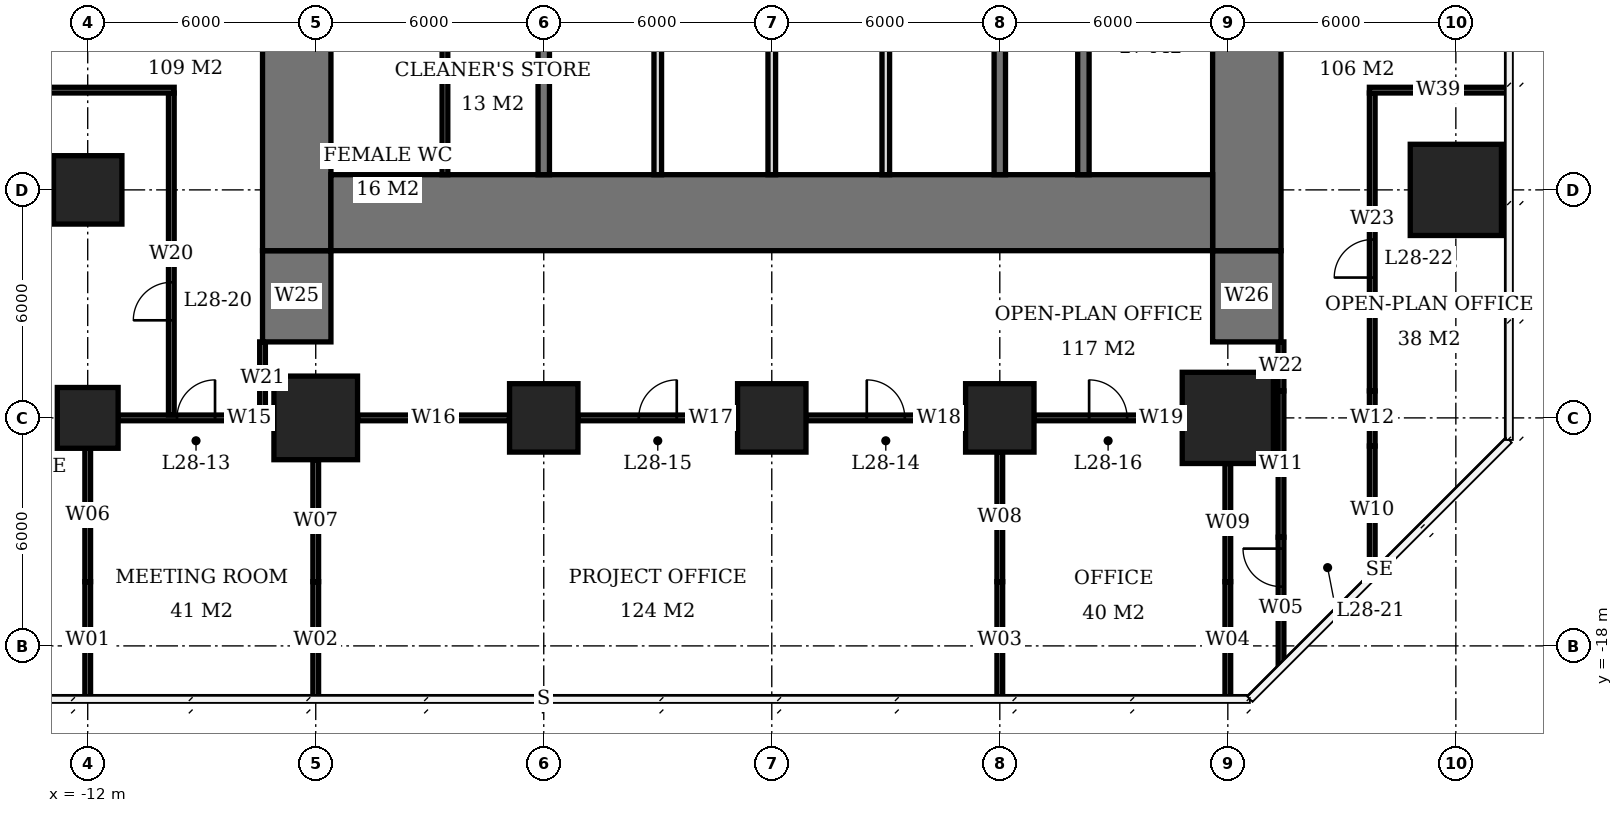
"""IFC4 building model, lengths in metres.
Left out: names, types, materials, properties, quantities, classifications, styles, units other than length and angle.
Written with IfcOpenShell. Run it as: python <this file> out.ifc"""

import sys

from ifc_helpers import new_model, si_unit, direction, frame, frame_2d, origin, origin_2d, place, context, subcontext, project, spatial, rectangle, extrude, element, fill, save


model = new_model("IFC4")
c1 = context("Model", 3, precision=1e-05, world=origin(), true_north=direction((0.0, 1.0)))
c2 = subcontext(c1, "Body", "Model", "MODEL_VIEW")
j1 = project(units=[si_unit("LENGTHUNIT", "METRE"), si_unit("PLANEANGLEUNIT", "RADIAN")], contexts=[c1])
p1 = place(None, origin())
s1 = spatial("IfcSite", under=j1, at=p1, CompositionType="ELEMENT")
p2 = place(p1, origin())
s2 = spatial("IfcBuilding", under=s1, at=p2, CompositionType="ELEMENT")
p3 = place(p2, frame((0.0, 0.0, 117.2)))
s3 = spatial("IfcBuildingStorey", under=s2, at=p3, CompositionType="ELEMENT", Elevation=117.2)
p4 = place(p3, frame((-12.0, -12.0, 0.0), z_axis=(0.0, 0.0, 1.0), x_axis=(1.0, 0.0, 0.0)))
e1 = element("IfcColumn", 1, at=p4, inside=s3, PredefinedType="COLUMN", context=c2, shape_type="SweptSolid", body=[
    extrude(rectangle(XDim=1.6, YDim=1.6, at=origin_2d()), origin(), (0.0, 0.0, 1.0), 3.9),
])
p5 = place(p3, frame((-12.0, -6.0, 0.0), z_axis=(0.0, 0.0, 1.0), x_axis=(1.0, 0.0, 0.0)))
e2 = element("IfcColumn", 2, at=p5, inside=s3, PredefinedType="COLUMN", context=c2, shape_type="SweptSolid", body=[
    extrude(rectangle(XDim=1.8, YDim=1.8, at=origin_2d()), origin(), (0.0, 0.0, 1.0), 3.9),
])
p6 = place(p3, frame((-6.0, -12.0, 0.0), z_axis=(0.0, 0.0, 1.0), x_axis=(1.0, 0.0, 0.0)))
e3 = element("IfcColumn", 3, at=p6, inside=s3, PredefinedType="COLUMN", context=c2, shape_type="SweptSolid", body=[
    extrude(rectangle(XDim=2.2, YDim=2.2, at=origin_2d()), origin(), (0.0, 0.0, 1.0), 3.9),
])
for number, where, z_axis, x_axis in (
    (4, (0.0, -12.0, 0.0), (0.0, 0.0, 1.0), (1.0, 0.0, 0.0)),
    (5, (6.0, -12.0, 0.0), (0.0, 0.0, 1.0), (1.0, 0.0, 0.0)),
    (6, (12.0, -12.0, 0.0), (0.0, 0.0, 1.0), (1.0, 0.0, 0.0)),
):
    element("IfcColumn", number, at=place(p3, frame(where, z_axis=z_axis, x_axis=x_axis)), inside=s3, PredefinedType="COLUMN", context=c2, shape_type="SweptSolid", body=[
        extrude(rectangle(XDim=1.8, YDim=1.8, at=origin_2d()), origin(), (0.0, 0.0, 1.0), 3.9),
    ])
for number, where, z_axis, x_axis in (
    (7, (18.0, -12.0, 0.0), (0.0, 0.0, 1.0), (1.0, 0.0, 0.0)),
    (8, (24.0, -6.0, 0.0), (0.0, 0.0, 1.0), (1.0, 0.0, 0.0)),
):
    element("IfcColumn", number, at=place(p3, frame(where, z_axis=z_axis, x_axis=x_axis)), inside=s3, PredefinedType="COLUMN", context=c2, shape_type="SweptSolid", body=[
        extrude(rectangle(XDim=2.4, YDim=2.4, at=origin_2d()), origin(), (0.0, 0.0, 1.0), 3.9),
    ])
p7 = place(p3, frame((-5.6, -6.6, 0.0), z_axis=(0.0, 0.0, 1.0), x_axis=(1.0, 0.0, 0.0)))
e9 = element("IfcWall", 9, at=p7, inside=s3, PredefinedType="SHEAR", context=c2, shape_type="SweptSolid", body=[
    extrude(rectangle(XDim=23.2, YDim=2.0, at=frame_2d((11.6, 0.0))), origin(), (0.0, 0.0, 1.0), 3.9),
])
p8 = place(p3, frame((-6.5, -7.6, 0.0), z_axis=(0.0, 0.0, 1.0), x_axis=(0.0, 1.0, 0.0)))
e10 = element("IfcWall", 10, at=p8, inside=s3, PredefinedType="SHEAR", context=c2, shape_type="SweptSolid", body=[
    extrude(rectangle(XDim=21.2, YDim=1.8, at=frame_2d((10.6, 0.0))), origin(), (0.0, 0.0, 1.0), 3.9),
])
p9 = place(p8, frame((7.8, 0.0, 0.0)))
e11 = element("IfcOpeningElement", 11, at=p9, cuts=e10, PredefinedType="OPENING", context=c2, shape_type="SweptSolid", body=[
    extrude(rectangle(XDim=1.8, YDim=2.4, at=frame_2d((0.9, 1.2))), frame((0.0, 0.91, 0.0), z_axis=(0.0, -1.0, 0.0), x_axis=(1.0, 0.0, 0.0)), (0.0, 0.0, 1.0), 1.82),
])
p10 = place(p3, frame((18.5, -7.6, 0.0), z_axis=(0.0, 0.0, 1.0), x_axis=(0.0, 1.0, 0.0)))
e12 = element("IfcWall", 12, at=p10, inside=s3, PredefinedType="SHEAR", context=c2, shape_type="SweptSolid", body=[
    extrude(rectangle(XDim=21.2, YDim=1.8, at=frame_2d((10.6, 0.0))), origin(), (0.0, 0.0, 1.0), 3.9),
])
p11 = place(p10, frame((9.2, 0.0, 0.0)))
e13 = element("IfcOpeningElement", 13, at=p11, cuts=e12, PredefinedType="OPENING", context=c2, shape_type="SweptSolid", body=[
    extrude(rectangle(XDim=1.8, YDim=2.4, at=frame_2d((0.9, 1.2))), frame((0.0, 0.91, 0.0), z_axis=(0.0, -1.0, 0.0), x_axis=(1.0, 0.0, 0.0)), (0.0, 0.0, 1.0), 1.82),
])
for number, where, z_axis, x_axis in (
    (14, (-6.5, -10.0, 0.0), (0.0, 0.0, 1.0), (0.0, 1.0, 0.0)),
    (15, (18.5, -10.0, 0.0), (0.0, 0.0, 1.0), (0.0, 1.0, 0.0)),
):
    element("IfcWall", number, at=place(p3, frame(where, z_axis=z_axis, x_axis=x_axis)), inside=s3, PredefinedType="SHEAR", context=c2, shape_type="SweptSolid", body=[
        extrude(rectangle(XDim=2.4, YDim=1.8, at=frame_2d((1.2, 0.0))), origin(), (0.0, 0.0, 1.0), 3.9),
    ])
for number, where, z_axis, x_axis in (
    (16, (0.0, -5.6, 0.0), (0.0, 0.0, 1.0), (0.0, 1.0, 0.0)),
    (17, (12.0, -5.6, 0.0), (0.0, 0.0, 1.0), (0.0, 1.0, 0.0)),
):
    element("IfcWall", number, at=place(p3, frame(where, z_axis=z_axis, x_axis=x_axis)), inside=s3, PredefinedType="SHEAR", context=c2, shape_type="SweptSolid", body=[
        extrude(rectangle(XDim=5.45, YDim=0.3, at=frame_2d((2.725, 0.0))), origin(), (0.0, 0.0, 1.0), 3.9),
    ])
p12 = place(p3, frame((14.2, -5.6, 0.0), z_axis=(0.0, 0.0, 1.0), x_axis=(0.0, 1.0, 0.0)))
e18 = element("IfcWall", 18, at=p12, inside=s3, PredefinedType="SHEAR", context=c2, shape_type="SweptSolid", body=[
    extrude(rectangle(XDim=8.45, YDim=0.3, at=frame_2d((4.225, 0.0))), origin(), (0.0, 0.0, 1.0), 3.9),
])
for number, where, z_axis, x_axis in (
    (19, (3.0, -5.6, 0.0), (0.0, 0.0, 1.0), (0.0, 1.0, 0.0)),
    (20, (6.0, -5.6, 0.0), (0.0, 0.0, 1.0), (0.0, 1.0, 0.0)),
    (21, (9.0, -5.6, 0.0), (0.0, 0.0, 1.0), (0.0, 1.0, 0.0)),
):
    element("IfcWall", number, at=place(p3, frame(where, z_axis=z_axis, x_axis=x_axis)), inside=s3, PredefinedType="SOLIDWALL", context=c2, shape_type="SweptSolid", body=[
        extrude(rectangle(XDim=5.45, YDim=0.2, at=frame_2d((2.725, 0.0))), origin(), (0.0, 0.0, 1.0), 3.9),
    ])
p13 = place(p3, frame((-2.6, -5.6, 0.0), z_axis=(0.0, 0.0, 1.0), x_axis=(0.0, 1.0, 0.0)))
e22 = element("IfcWall", 22, at=p13, inside=s3, PredefinedType="PLUMBINGWALL", context=c2, shape_type="SweptSolid", body=[
    extrude(rectangle(XDim=5.45, YDim=0.15, at=frame_2d((2.725, 0.0))), origin(), (0.0, 0.0, 1.0), 3.65),
])
p14 = place(p3, frame((-11.2, -12.0, 0.0), z_axis=(0.0, 0.0, 1.0), x_axis=(1.0, 0.0, 0.0)))
e23 = element("IfcWall", 23, at=p14, inside=s3, PredefinedType="PARTITIONING", context=c2, shape_type="SweptSolid", body=[
    extrude(rectangle(XDim=4.1, YDim=0.15, at=frame_2d((2.05, 0.0))), origin(), (0.0, 0.0, 1.0), 3.65),
])
p15 = place(p14, frame((1.55, 0.0, 0.0)))
e24 = element("IfcOpeningElement", 24, at=p15, cuts=e23, PredefinedType="OPENING", context=c2, shape_type="SweptSolid", body=[
    extrude(rectangle(XDim=1.0, YDim=2.1, at=frame_2d((0.5, 1.05))), frame((0.0, 0.085, 0.0), z_axis=(0.0, -1.0, 0.0), x_axis=(1.0, 0.0, 0.0)), (0.0, 0.0, 1.0), 0.17),
])
p16 = place(p3, frame((-4.9, -12.0, 0.0), z_axis=(0.0, 0.0, 1.0), x_axis=(1.0, 0.0, 0.0)))
e25 = element("IfcWall", 25, at=p16, inside=s3, PredefinedType="PARTITIONING", context=c2, shape_type="SweptSolid", body=[
    extrude(rectangle(XDim=4.0, YDim=0.15, at=frame_2d((2.0, 0.0))), origin(), (0.0, 0.0, 1.0), 3.65),
])
p17 = place(p3, frame((0.9, -12.0, 0.0), z_axis=(0.0, 0.0, 1.0), x_axis=(1.0, 0.0, 0.0)))
e26 = element("IfcWall", 26, at=p17, inside=s3, PredefinedType="PARTITIONING", context=c2, shape_type="SweptSolid", body=[
    extrude(rectangle(XDim=4.2, YDim=0.15, at=frame_2d((2.1, 0.0))), origin(), (0.0, 0.0, 1.0), 3.65),
])
p18 = place(p17, frame((1.6, 0.0, 0.0)))
e27 = element("IfcOpeningElement", 27, at=p18, cuts=e26, PredefinedType="OPENING", context=c2, shape_type="SweptSolid", body=[
    extrude(rectangle(XDim=1.0, YDim=2.1, at=frame_2d((0.5, 1.05))), frame((0.0, 0.085, 0.0), z_axis=(0.0, -1.0, 0.0), x_axis=(1.0, 0.0, 0.0)), (0.0, 0.0, 1.0), 0.17),
])
p19 = place(p3, frame((6.9, -12.0, 0.0), z_axis=(0.0, 0.0, 1.0), x_axis=(1.0, 0.0, 0.0)))
e28 = element("IfcWall", 28, at=p19, inside=s3, PredefinedType="PARTITIONING", context=c2, shape_type="SweptSolid", body=[
    extrude(rectangle(XDim=4.2, YDim=0.15, at=frame_2d((2.1, 0.0))), origin(), (0.0, 0.0, 1.0), 3.65),
])
p20 = place(p19, frame((1.6, 0.0, 0.0)))
e29 = element("IfcOpeningElement", 29, at=p20, cuts=e28, PredefinedType="OPENING", context=c2, shape_type="SweptSolid", body=[
    extrude(rectangle(XDim=1.0, YDim=2.1, at=frame_2d((0.5, 1.05))), frame((0.0, 0.085, 0.0), z_axis=(0.0, -1.0, 0.0), x_axis=(1.0, 0.0, 0.0)), (0.0, 0.0, 1.0), 0.17),
])
p21 = place(p3, frame((12.9, -12.0, 0.0), z_axis=(0.0, 0.0, 1.0), x_axis=(1.0, 0.0, 0.0)))
e30 = element("IfcWall", 30, at=p21, inside=s3, PredefinedType="PARTITIONING", context=c2, shape_type="SweptSolid", body=[
    extrude(rectangle(XDim=3.9, YDim=0.15, at=frame_2d((1.95, 0.0))), origin(), (0.0, 0.0, 1.0), 3.65),
])
p22 = place(p21, frame((1.45, 0.0, 0.0)))
e31 = element("IfcOpeningElement", 31, at=p22, cuts=e30, PredefinedType="OPENING", context=c2, shape_type="SweptSolid", body=[
    extrude(rectangle(XDim=1.0, YDim=2.1, at=frame_2d((0.5, 1.05))), frame((0.0, 0.085, 0.0), z_axis=(0.0, -1.0, 0.0), x_axis=(1.0, 0.0, 0.0)), (0.0, 0.0, 1.0), 0.17),
])
p23 = place(p3, frame((-12.0, -19.4, 0.0), z_axis=(0.0, 0.0, 1.0), x_axis=(0.0, 1.0, 0.0)))
e32 = element("IfcWall", 32, at=p23, inside=s3, PredefinedType="PARTITIONING", context=c2, shape_type="SweptSolid", body=[
    extrude(rectangle(XDim=3.09, YDim=0.15, at=frame_2d((1.545, 0.0))), origin(), (0.0, 0.0, 1.0), 3.65),
])
p24 = place(p3, frame((-12.0, -16.31, 0.0), z_axis=(0.0, 0.0, 1.0), x_axis=(0.0, 1.0, 0.0)))
e33 = element("IfcWall", 33, at=p24, inside=s3, PredefinedType="PARTITIONING", context=c2, shape_type="SweptSolid", body=[
    extrude(rectangle(XDim=3.51, YDim=0.15, at=frame_2d((1.755, 0.0))), origin(), (0.0, 0.0, 1.0), 2.65),
])
p25 = place(p3, frame((-6.0, -19.4, 0.0), z_axis=(0.0, 0.0, 1.0), x_axis=(0.0, 1.0, 0.0)))
e34 = element("IfcWall", 34, at=p25, inside=s3, PredefinedType="PARTITIONING", context=c2, shape_type="SweptSolid", body=[
    extrude(rectangle(XDim=3.09, YDim=0.15, at=frame_2d((1.545, 0.0))), origin(), (0.0, 0.0, 1.0), 3.65),
])
p26 = place(p3, frame((-6.0, -16.31, 0.0), z_axis=(0.0, 0.0, 1.0), x_axis=(0.0, 1.0, 0.0)))
e35 = element("IfcWall", 35, at=p26, inside=s3, PredefinedType="PARTITIONING", context=c2, shape_type="SweptSolid", body=[
    extrude(rectangle(XDim=3.21, YDim=0.15, at=frame_2d((1.605, 0.0))), origin(), (0.0, 0.0, 1.0), 2.65),
])
p27 = place(p3, frame((12.0, -19.4, 0.0), z_axis=(0.0, 0.0, 1.0), x_axis=(0.0, 1.0, 0.0)))
e36 = element("IfcWall", 36, at=p27, inside=s3, PredefinedType="PARTITIONING", context=c2, shape_type="SweptSolid", body=[
    extrude(rectangle(XDim=3.09, YDim=0.15, at=frame_2d((1.545, 0.0))), origin(), (0.0, 0.0, 1.0), 3.65),
])
p28 = place(p3, frame((12.0, -16.31, 0.0), z_axis=(0.0, 0.0, 1.0), x_axis=(0.0, 1.0, 0.0)))
e37 = element("IfcWall", 37, at=p28, inside=s3, PredefinedType="PARTITIONING", context=c2, shape_type="SweptSolid", body=[
    extrude(rectangle(XDim=3.41, YDim=0.15, at=frame_2d((1.705, 0.0))), origin(), (0.0, 0.0, 1.0), 2.65),
])
p29 = place(p3, frame((18.0, -19.4, 0.0), z_axis=(0.0, 0.0, 1.0), x_axis=(0.0, 1.0, 0.0)))
e38 = element("IfcWall", 38, at=p29, inside=s3, PredefinedType="PARTITIONING", context=c2, shape_type="SweptSolid", body=[
    extrude(rectangle(XDim=3.09, YDim=0.15, at=frame_2d((1.545, 0.0))), origin(), (0.0, 0.0, 1.0), 3.65),
])
p30 = place(p3, frame((18.0, -16.31, 0.0), z_axis=(0.0, 0.0, 1.0), x_axis=(0.0, 1.0, 0.0)))
e39 = element("IfcWall", 39, at=p30, inside=s3, PredefinedType="PARTITIONING", context=c2, shape_type="SweptSolid", body=[
    extrude(rectangle(XDim=3.11, YDim=0.15, at=frame_2d((1.555, 0.0))), origin(), (0.0, 0.0, 1.0), 2.65),
])
p31 = place(p3, frame((-17.925, -3.375, 0.0), z_axis=(0.0, 0.0, 1.0), x_axis=(1.0, 0.0, 0.0)))
e40 = element("IfcWall", 40, at=p31, inside=s3, PredefinedType="PARTITIONING", context=c2, shape_type="SweptSolid", body=[
    extrude(rectangle(XDim=8.2, YDim=0.15, at=frame_2d((4.1, 0.0))), origin(), (0.0, 0.0, 1.0), 3.65),
])
p32 = place(p3, frame((-9.8, -11.925, 0.0), z_axis=(0.0, 0.0, 1.0), x_axis=(0.0, 1.0, 0.0)))
e41 = element("IfcWall", 41, at=p32, inside=s3, PredefinedType="PARTITIONING", context=c2, shape_type="SweptSolid", body=[
    extrude(rectangle(XDim=8.475, YDim=0.15, at=frame_2d((4.238, 0.0))), origin(), (0.0, 0.0, 1.0), 3.65),
])
p33 = place(p32, frame((2.493, 0.0, 0.0)))
e42 = element("IfcOpeningElement", 42, at=p33, cuts=e41, PredefinedType="OPENING", context=c2, shape_type="SweptSolid", body=[
    extrude(rectangle(XDim=1.0, YDim=2.1, at=frame_2d((0.5, 1.05))), frame((0.0, 0.085, 0.0), z_axis=(0.0, -1.0, 0.0), x_axis=(1.0, 0.0, 0.0)), (0.0, 0.0, 1.0), 0.17),
])
p34 = place(p3, frame((-7.4, -11.925, 0.0), z_axis=(0.0, 0.0, 1.0), x_axis=(0.0, 1.0, 0.0)))
e43 = element("IfcWall", 43, at=p34, inside=s3, PredefinedType="PARTITIONING", context=c2, shape_type="SweptSolid", body=[
    extrude(rectangle(XDim=1.925, YDim=0.15, at=frame_2d((0.962, 0.0))), origin(), (0.0, 0.0, 1.0), 3.65),
])
p35 = place(p3, frame((19.4, -18.489, 0.0), z_axis=(0.0, 0.0, 1.0), x_axis=(0.0, 1.0, 0.0)))
e44 = element("IfcWall", 44, at=p35, inside=s3, PredefinedType="PARTITIONING", context=c2, shape_type="SweptSolid", body=[
    extrude(rectangle(XDim=3.349, YDim=0.15, at=frame_2d((1.675, 0.0))), origin(), (0.0, 0.0, 1.0), 3.65),
])
p36 = place(p35, frame((2.049, 0.0, 0.0)))
e45 = element("IfcOpeningElement", 45, at=p36, cuts=e44, PredefinedType="OPENING", context=c2, shape_type="SweptSolid", body=[
    extrude(rectangle(XDim=1.0, YDim=2.1, at=frame_2d((0.5, 1.05))), frame((0.0, 0.085, 0.0), z_axis=(0.0, -1.0, 0.0), x_axis=(1.0, 0.0, 0.0)), (0.0, 0.0, 1.0), 0.17),
])
p37 = place(p3, frame((19.4, -15.14, 0.0), z_axis=(0.0, 0.0, 1.0), x_axis=(0.0, 1.0, 0.0)))
e46 = element("IfcWall", 46, at=p37, inside=s3, PredefinedType="PARTITIONING", context=c2, shape_type="SweptSolid", body=[
    extrude(rectangle(XDim=3.85, YDim=0.15, at=frame_2d((1.925, 0.0))), origin(), (0.0, 0.0, 1.0), 2.65),
])
p38 = place(p3, frame((19.4, -11.29, 0.0), z_axis=(0.0, 0.0, 1.0), x_axis=(0.0, 1.0, 0.0)))
e47 = element("IfcWall", 47, at=p38, inside=s3, PredefinedType="PARTITIONING", context=c2, shape_type="SweptSolid", body=[
    extrude(rectangle(XDim=1.29, YDim=0.15, at=frame_2d((0.645, 0.0))), origin(), (0.0, 0.0, 1.0), 3.65),
])
p39 = place(p3, frame((21.8, -16.089, 0.0), z_axis=(0.0, 0.0, 1.0), x_axis=(0.0, 1.0, 0.0)))
e48 = element("IfcWall", 48, at=p39, inside=s3, PredefinedType="PARTITIONING", context=c2, shape_type="SweptSolid", body=[
    extrude(rectangle(XDim=3.349, YDim=0.15, at=frame_2d((1.675, 0.0))), origin(), (0.0, 0.0, 1.0), 3.65),
])
p40 = place(p3, frame((21.8, -12.74, 0.0), z_axis=(0.0, 0.0, 1.0), x_axis=(0.0, 1.0, 0.0)))
e49 = element("IfcWall", 49, at=p40, inside=s3, PredefinedType="PARTITIONING", context=c2, shape_type="SweptSolid", body=[
    extrude(rectangle(XDim=1.45, YDim=0.15, at=frame_2d((0.725, 0.0))), origin(), (0.0, 0.0, 1.0), 2.65),
])
p41 = place(p3, frame((21.8, -11.29, 0.0), z_axis=(0.0, 0.0, 1.0), x_axis=(0.0, 1.0, 0.0)))
e50 = element("IfcWall", 50, at=p41, inside=s3, PredefinedType="PARTITIONING", context=c2, shape_type="SweptSolid", body=[
    extrude(rectangle(XDim=7.84, YDim=0.15, at=frame_2d((3.92, 0.0))), origin(), (0.0, 0.0, 1.0), 3.65),
])
p42 = place(p41, frame((2.983, 0.0, 0.0)))
e51 = element("IfcOpeningElement", 51, at=p42, cuts=e50, PredefinedType="OPENING", context=c2, shape_type="SweptSolid", body=[
    extrude(rectangle(XDim=1.0, YDim=2.1, at=frame_2d((0.5, 1.05))), frame((0.0, 0.085, 0.0), z_axis=(0.0, -1.0, 0.0), x_axis=(1.0, 0.0, 0.0)), (0.0, 0.0, 1.0), 0.17),
])
p43 = place(p3, frame((21.725, -3.375, 0.0), z_axis=(0.0, 0.0, 1.0), x_axis=(1.0, 0.0, 0.0)))
e52 = element("IfcWall", 52, at=p43, inside=s3, PredefinedType="PARTITIONING", context=c2, shape_type="SweptSolid", body=[
    extrude(rectangle(XDim=3.625, YDim=0.15, at=frame_2d((1.812, 0.0))), origin(), (0.0, 0.0, 1.0), 3.65),
])
p44 = place(p15, origin())
e53 = element("IfcDoor", 53, at=p44, inside=s3, OperationType="SINGLE_SWING_RIGHT", PredefinedType="DOOR", context=c2, shape_type="SweptSolid", body=[
    extrude(rectangle(XDim=1.0, YDim=2.1, at=frame_2d((0.5, 1.05))), frame((0.0, 0.025, 0.0), z_axis=(0.0, -1.0, 0.0), x_axis=(1.0, 0.0, 0.0)), (0.0, 0.0, 1.0), 0.05),
])
fill(e24, e53)
p45 = place(p20, origin())
e54 = element("IfcDoor", 54, at=p45, inside=s3, OperationType="SINGLE_SWING_LEFT", PredefinedType="DOOR", context=c2, shape_type="SweptSolid", body=[
    extrude(rectangle(XDim=1.0, YDim=2.1, at=frame_2d((0.5, 1.05))), frame((0.0, 0.025, 0.0), z_axis=(0.0, -1.0, 0.0), x_axis=(1.0, 0.0, 0.0)), (0.0, 0.0, 1.0), 0.05),
])
fill(e29, e54)
p46 = place(p18, origin())
e55 = element("IfcDoor", 55, at=p46, inside=s3, OperationType="SINGLE_SWING_RIGHT", PredefinedType="DOOR", context=c2, shape_type="SweptSolid", body=[
    extrude(rectangle(XDim=1.0, YDim=2.1, at=frame_2d((0.5, 1.05))), frame((0.0, 0.025, 0.0), z_axis=(0.0, -1.0, 0.0), x_axis=(1.0, 0.0, 0.0)), (0.0, 0.0, 1.0), 0.05),
])
fill(e27, e55)
p47 = place(p22, origin())
e56 = element("IfcDoor", 56, at=p47, inside=s3, OperationType="SINGLE_SWING_LEFT", PredefinedType="DOOR", context=c2, shape_type="SweptSolid", body=[
    extrude(rectangle(XDim=1.0, YDim=2.1, at=frame_2d((0.5, 1.05))), frame((0.0, 0.025, 0.0), z_axis=(0.0, -1.0, 0.0), x_axis=(1.0, 0.0, 0.0)), (0.0, 0.0, 1.0), 0.05),
])
fill(e31, e56)
p48 = place(p33, origin())
e57 = element("IfcDoor", 57, at=p48, inside=s3, OperationType="SINGLE_SWING_LEFT", PredefinedType="DOOR", context=c2, shape_type="SweptSolid", body=[
    extrude(rectangle(XDim=1.0, YDim=2.1, at=frame_2d((0.5, 1.05))), frame((0.0, 0.025, 0.0), z_axis=(0.0, -1.0, 0.0), x_axis=(1.0, 0.0, 0.0)), (0.0, 0.0, 1.0), 0.05),
])
fill(e42, e57)
p49 = place(p36, origin())
e58 = element("IfcDoor", 58, at=p49, inside=s3, OperationType="SINGLE_SWING_RIGHT", PredefinedType="DOOR", context=c2, shape_type="SweptSolid", body=[
    extrude(rectangle(XDim=1.0, YDim=2.1, at=frame_2d((0.5, 1.05))), frame((0.0, 0.025, 0.0), z_axis=(0.0, -1.0, 0.0), x_axis=(1.0, 0.0, 0.0)), (0.0, 0.0, 1.0), 0.05),
])
fill(e45, e58)
p50 = place(p42, origin())
e59 = element("IfcDoor", 59, at=p50, inside=s3, OperationType="SINGLE_SWING_LEFT", PredefinedType="DOOR", context=c2, shape_type="SweptSolid", body=[
    extrude(rectangle(XDim=1.0, YDim=2.1, at=frame_2d((0.5, 1.05))), frame((0.0, 0.025, 0.0), z_axis=(0.0, -1.0, 0.0), x_axis=(1.0, 0.0, 0.0)), (0.0, 0.0, 1.0), 0.05),
])
fill(e51, e59)
save(model, sys.argv[1])
